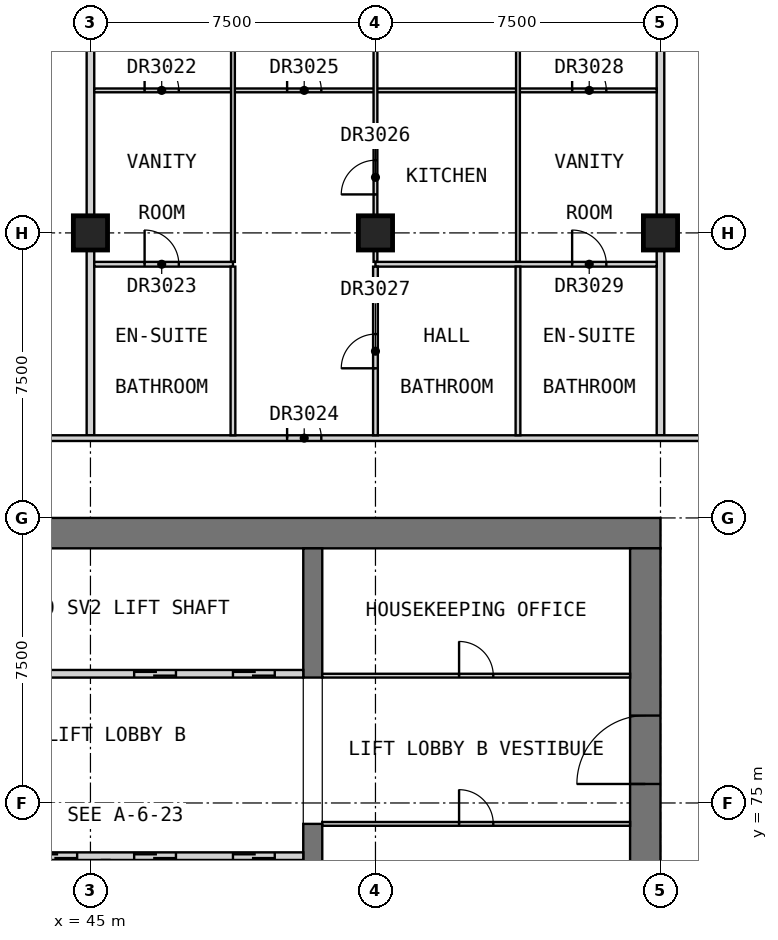
"""IFC4 building model, lengths in metres.
Left out: names, types, materials, properties, quantities, classifications, styles, units other than length and angle.
Written with IfcOpenShell. Run it as: python <this file> out.ifc"""

import sys

from ifc_helpers import new_model, si_unit, direction, frame, frame_2d, origin, origin_2d, place, context, subcontext, project, spatial, rectangle, extrude, element, fill, save


model = new_model("IFC4")
c1 = context("Model", 3, precision=1e-05, world=origin(), true_north=direction((0.0, 1.0)))
c2 = subcontext(c1, "Body", "Model", "MODEL_VIEW")
j1 = project(units=[si_unit("LENGTHUNIT", "METRE"), si_unit("PLANEANGLEUNIT", "RADIAN")], contexts=[c1])
p1 = place(None, origin())
s1 = spatial("IfcSite", under=j1, at=p1, CompositionType="ELEMENT")
p2 = place(p1, origin())
s2 = spatial("IfcBuilding", under=s1, at=p2, CompositionType="ELEMENT")
p3 = place(p2, frame((0.0, 0.0, 186.2)))
s3 = spatial("IfcBuildingStorey", under=s2, at=p3, CompositionType="ELEMENT", Elevation=186.2)
for number, where, z_axis, x_axis in (
    (1, (45.0, 90.0, 0.0), (0.0, 0.0, 1.0), (1.0, 0.0, 0.0)),
    (2, (52.5, 90.0, 0.0), (0.0, 0.0, 1.0), (1.0, 0.0, 0.0)),
    (3, (60.0, 90.0, 0.0), (0.0, 0.0, 1.0), (1.0, 0.0, 0.0)),
):
    element("IfcColumn", number, at=place(p3, frame(where, z_axis=z_axis, x_axis=x_axis)), inside=s3, PredefinedType="COLUMN", context=c2, shape_type="SweptSolid", body=[
        extrude(rectangle(XDim=0.9, YDim=0.9, at=origin_2d()), origin(), (0.0, 0.0, 1.0), 3.5),
    ])
p4 = place(p3, frame((30.0, 82.1, 0.0), z_axis=(0.0, 0.0, 1.0), x_axis=(1.0, 0.0, 0.0)))
e4 = element("IfcWall", 4, at=p4, inside=s3, PredefinedType="SHEAR", context=c2, shape_type="SweptSolid", body=[
    extrude(rectangle(XDim=30.0, YDim=0.8, at=frame_2d((15.0, 0.0))), origin(), (0.0, 0.0, 1.0), 3.5),
])
p5 = place(p3, frame((59.6, 60.8, 0.0), z_axis=(0.0, 0.0, 1.0), x_axis=(0.0, 1.0, 0.0)))
e5 = element("IfcWall", 5, at=p5, inside=s3, PredefinedType="SHEAR", context=c2, shape_type="SweptSolid", body=[
    extrude(rectangle(XDim=20.9, YDim=0.8, at=frame_2d((10.45, 0.0))), origin(), (0.0, 0.0, 1.0), 3.5),
])
p6 = place(p5, frame((14.7, 0.0, 0.0)))
e6 = element("IfcOpeningElement", 6, at=p6, cuts=e5, PredefinedType="OPENING", context=c2, shape_type="SweptSolid", body=[
    extrude(rectangle(XDim=1.8, YDim=2.1, at=frame_2d((0.9, 1.05))), frame((0.0, 0.41, 0.0), z_axis=(0.0, -1.0, 0.0), x_axis=(1.0, 0.0, 0.0)), (0.0, 0.0, 1.0), 0.82),
])
p7 = place(p3, frame((50.85, 68.05, 0.0), z_axis=(0.0, 0.0, 1.0), x_axis=(0.0, 1.0, 0.0)))
e7 = element("IfcWall", 7, at=p7, inside=s3, PredefinedType="SHEAR", context=c2, shape_type="SweptSolid", body=[
    extrude(rectangle(XDim=6.4, YDim=0.5, at=frame_2d((3.2, 0.0))), origin(), (0.0, 0.0, 1.0), 3.5),
])
p8 = place(p3, frame((50.85, 78.3, 0.0), z_axis=(0.0, 0.0, 1.0), x_axis=(0.0, 1.0, 0.0)))
e8 = element("IfcWall", 8, at=p8, inside=s3, PredefinedType="SHEAR", context=c2, shape_type="SweptSolid", body=[
    extrude(rectangle(XDim=3.4, YDim=0.5, at=frame_2d((1.7, 0.0))), origin(), (0.0, 0.0, 1.0), 3.5),
])
p9 = place(p3, frame((35.0, 73.6, 0.0), z_axis=(0.0, 0.0, 1.0), x_axis=(1.0, 0.0, 0.0)))
e9 = element("IfcWall", 9, at=p9, inside=s3, PredefinedType="SOLIDWALL", context=c2, shape_type="SweptSolid", body=[
    extrude(rectangle(XDim=15.6, YDim=0.2, at=frame_2d((7.8, 0.0))), origin(), (0.0, 0.0, 1.0), 3.5),
])
p10 = place(p9, frame((0.75, 0.0, 0.0)))
e10 = element("IfcOpeningElement", 10, at=p10, cuts=e9, PredefinedType="OPENING", context=c2, shape_type="SweptSolid", body=[
    extrude(rectangle(XDim=1.1, YDim=2.1, at=frame_2d((0.55, 1.05))), frame((0.0, 0.11, 0.0), z_axis=(0.0, -1.0, 0.0), x_axis=(1.0, 0.0, 0.0)), (0.0, 0.0, 1.0), 0.22),
])
p11 = place(p9, frame((3.35, 0.0, 0.0)))
e11 = element("IfcOpeningElement", 11, at=p11, cuts=e9, PredefinedType="OPENING", context=c2, shape_type="SweptSolid", body=[
    extrude(rectangle(XDim=1.1, YDim=2.1, at=frame_2d((0.55, 1.05))), frame((0.0, 0.11, 0.0), z_axis=(0.0, -1.0, 0.0), x_axis=(1.0, 0.0, 0.0)), (0.0, 0.0, 1.0), 0.22),
])
p12 = place(p9, frame((5.95, 0.0, 0.0)))
e12 = element("IfcOpeningElement", 12, at=p12, cuts=e9, PredefinedType="OPENING", context=c2, shape_type="SweptSolid", body=[
    extrude(rectangle(XDim=1.1, YDim=2.1, at=frame_2d((0.55, 1.05))), frame((0.0, 0.11, 0.0), z_axis=(0.0, -1.0, 0.0), x_axis=(1.0, 0.0, 0.0)), (0.0, 0.0, 1.0), 0.22),
])
p13 = place(p9, frame((8.55, 0.0, 0.0)))
e13 = element("IfcOpeningElement", 13, at=p13, cuts=e9, PredefinedType="OPENING", context=c2, shape_type="SweptSolid", body=[
    extrude(rectangle(XDim=1.1, YDim=2.1, at=frame_2d((0.55, 1.05))), frame((0.0, 0.11, 0.0), z_axis=(0.0, -1.0, 0.0), x_axis=(1.0, 0.0, 0.0)), (0.0, 0.0, 1.0), 0.22),
])
p14 = place(p9, frame((11.15, 0.0, 0.0)))
e14 = element("IfcOpeningElement", 14, at=p14, cuts=e9, PredefinedType="OPENING", context=c2, shape_type="SweptSolid", body=[
    extrude(rectangle(XDim=1.1, YDim=2.1, at=frame_2d((0.55, 1.05))), frame((0.0, 0.11, 0.0), z_axis=(0.0, -1.0, 0.0), x_axis=(1.0, 0.0, 0.0)), (0.0, 0.0, 1.0), 0.22),
])
p15 = place(p9, frame((13.75, 0.0, 0.0)))
e15 = element("IfcOpeningElement", 15, at=p15, cuts=e9, PredefinedType="OPENING", context=c2, shape_type="SweptSolid", body=[
    extrude(rectangle(XDim=1.1, YDim=2.1, at=frame_2d((0.55, 1.05))), frame((0.0, 0.11, 0.0), z_axis=(0.0, -1.0, 0.0), x_axis=(1.0, 0.0, 0.0)), (0.0, 0.0, 1.0), 0.22),
])
p16 = place(p3, frame((35.0, 78.4, 0.0), z_axis=(0.0, 0.0, 1.0), x_axis=(1.0, 0.0, 0.0)))
e16 = element("IfcWall", 16, at=p16, inside=s3, PredefinedType="SOLIDWALL", context=c2, shape_type="SweptSolid", body=[
    extrude(rectangle(XDim=15.6, YDim=0.2, at=frame_2d((7.8, 0.0))), origin(), (0.0, 0.0, 1.0), 3.5),
])
p17 = place(p16, frame((0.75, 0.0, 0.0)))
e17 = element("IfcOpeningElement", 17, at=p17, cuts=e16, PredefinedType="OPENING", context=c2, shape_type="SweptSolid", body=[
    extrude(rectangle(XDim=1.1, YDim=2.1, at=frame_2d((0.55, 1.05))), frame((0.0, 0.11, 0.0), z_axis=(0.0, -1.0, 0.0), x_axis=(1.0, 0.0, 0.0)), (0.0, 0.0, 1.0), 0.22),
])
p18 = place(p16, frame((3.35, 0.0, 0.0)))
e18 = element("IfcOpeningElement", 18, at=p18, cuts=e16, PredefinedType="OPENING", context=c2, shape_type="SweptSolid", body=[
    extrude(rectangle(XDim=1.1, YDim=2.1, at=frame_2d((0.55, 1.05))), frame((0.0, 0.11, 0.0), z_axis=(0.0, -1.0, 0.0), x_axis=(1.0, 0.0, 0.0)), (0.0, 0.0, 1.0), 0.22),
])
p19 = place(p16, frame((11.15, 0.0, 0.0)))
e19 = element("IfcOpeningElement", 19, at=p19, cuts=e16, PredefinedType="OPENING", context=c2, shape_type="SweptSolid", body=[
    extrude(rectangle(XDim=1.1, YDim=2.1, at=frame_2d((0.55, 1.05))), frame((0.0, 0.11, 0.0), z_axis=(0.0, -1.0, 0.0), x_axis=(1.0, 0.0, 0.0)), (0.0, 0.0, 1.0), 0.22),
])
p20 = place(p16, frame((13.75, 0.0, 0.0)))
e20 = element("IfcOpeningElement", 20, at=p20, cuts=e16, PredefinedType="OPENING", context=c2, shape_type="SweptSolid", body=[
    extrude(rectangle(XDim=1.1, YDim=2.1, at=frame_2d((0.55, 1.05))), frame((0.0, 0.11, 0.0), z_axis=(0.0, -1.0, 0.0), x_axis=(1.0, 0.0, 0.0)), (0.0, 0.0, 1.0), 0.22),
])
p21 = place(p3, frame((51.1, 74.45, 0.0), z_axis=(0.0, 0.0, 1.0), x_axis=(1.0, 0.0, 0.0)))
e21 = element("IfcWall", 21, at=p21, inside=s3, PredefinedType="PARTITIONING", context=c2, shape_type="SweptSolid", body=[
    extrude(rectangle(XDim=8.1, YDim=0.1, at=frame_2d((4.05, 0.0))), origin(), (0.0, 0.0, 1.0), 3.25),
])
p22 = place(p21, frame((3.6, 0.0, 0.0)))
e22 = element("IfcOpeningElement", 22, at=p22, cuts=e21, PredefinedType="OPENING", context=c2, shape_type="SweptSolid", body=[
    extrude(rectangle(XDim=0.9, YDim=2.1, at=frame_2d((0.45, 1.05))), frame((0.0, 0.06, 0.0), z_axis=(0.0, -1.0, 0.0), x_axis=(1.0, 0.0, 0.0)), (0.0, 0.0, 1.0), 0.12),
])
p23 = place(p3, frame((51.1, 78.35, 0.0), z_axis=(0.0, 0.0, 1.0), x_axis=(1.0, 0.0, 0.0)))
e23 = element("IfcWall", 23, at=p23, inside=s3, PredefinedType="PARTITIONING", context=c2, shape_type="SweptSolid", body=[
    extrude(rectangle(XDim=8.1, YDim=0.1, at=frame_2d((4.05, 0.0))), origin(), (0.0, 0.0, 1.0), 3.25),
])
p24 = place(p23, frame((3.6, 0.0, 0.0)))
e24 = element("IfcOpeningElement", 24, at=p24, cuts=e23, PredefinedType="OPENING", context=c2, shape_type="SweptSolid", body=[
    extrude(rectangle(XDim=0.9, YDim=2.1, at=frame_2d((0.45, 1.05))), frame((0.0, 0.06, 0.0), z_axis=(0.0, -1.0, 0.0), x_axis=(1.0, 0.0, 0.0)), (0.0, 0.0, 1.0), 0.12),
])
for number, where, z_axis, x_axis in (
    (25, (45.0, 84.675, 0.0), (0.0, 0.0, 1.0), (0.0, 1.0, 0.0)),
    (26, (60.0, 84.675, 0.0), (0.0, 0.0, 1.0), (0.0, 1.0, 0.0)),
):
    element("IfcWall", number, at=place(p3, frame(where, z_axis=z_axis, x_axis=x_axis)), inside=s3, PredefinedType="PARTITIONING", context=c2, shape_type="SweptSolid", body=[
        extrude(rectangle(XDim=16.575, YDim=0.2, at=frame_2d((8.288, 0.0))), origin(), (0.0, 0.0, 1.0), 3.25),
    ])
p25 = place(p3, frame((33.75, 84.6, 0.0), z_axis=(0.0, 0.0, 1.0), x_axis=(1.0, 0.0, 0.0)))
e27 = element("IfcWall", 27, at=p25, inside=s3, PredefinedType="PARTITIONING", context=c2, shape_type="SweptSolid", body=[
    extrude(rectangle(XDim=28.35, YDim=0.15, at=frame_2d((14.175, 0.0))), origin(), (0.0, 0.0, 1.0), 3.25),
])
p26 = place(p25, frame((5.125, 0.0, 0.0)))
e28 = element("IfcOpeningElement", 28, at=p26, cuts=e27, PredefinedType="OPENING", context=c2, shape_type="SweptSolid", body=[
    extrude(rectangle(XDim=1.0, YDim=2.1, at=frame_2d((0.5, 1.05))), frame((0.0, 0.085, 0.0), z_axis=(0.0, -1.0, 0.0), x_axis=(1.0, 0.0, 0.0)), (0.0, 0.0, 1.0), 0.17),
])
p27 = place(p25, frame((16.425, 0.0, 0.0)))
e29 = element("IfcOpeningElement", 29, at=p27, cuts=e27, PredefinedType="OPENING", context=c2, shape_type="SweptSolid", body=[
    extrude(rectangle(XDim=0.9, YDim=2.1, at=frame_2d((0.45, 1.05))), frame((0.0, 0.085, 0.0), z_axis=(0.0, -1.0, 0.0), x_axis=(1.0, 0.0, 0.0)), (0.0, 0.0, 1.0), 0.17),
])
p28 = place(p3, frame((45.1, 93.75, 0.0), z_axis=(0.0, 0.0, 1.0), x_axis=(1.0, 0.0, 0.0)))
e30 = element("IfcWall", 30, at=p28, inside=s3, PredefinedType="PARTITIONING", context=c2, shape_type="SweptSolid", body=[
    extrude(rectangle(XDim=14.8, YDim=0.1, at=frame_2d((7.4, 0.0))), origin(), (0.0, 0.0, 1.0), 3.25),
])
p29 = place(p28, frame((1.325, 0.0, 0.0)))
e31 = element("IfcOpeningElement", 31, at=p29, cuts=e30, PredefinedType="OPENING", context=c2, shape_type="SweptSolid", body=[
    extrude(rectangle(XDim=0.9, YDim=2.1, at=frame_2d((0.45, 1.05))), frame((0.0, 0.06, 0.0), z_axis=(0.0, -1.0, 0.0), x_axis=(1.0, 0.0, 0.0)), (0.0, 0.0, 1.0), 0.12),
])
p30 = place(p28, frame((5.075, 0.0, 0.0)))
e32 = element("IfcOpeningElement", 32, at=p30, cuts=e30, PredefinedType="OPENING", context=c2, shape_type="SweptSolid", body=[
    extrude(rectangle(XDim=0.9, YDim=2.1, at=frame_2d((0.45, 1.05))), frame((0.0, 0.06, 0.0), z_axis=(0.0, -1.0, 0.0), x_axis=(1.0, 0.0, 0.0)), (0.0, 0.0, 1.0), 0.12),
])
p31 = place(p28, frame((12.575, 0.0, 0.0)))
e33 = element("IfcOpeningElement", 33, at=p31, cuts=e30, PredefinedType="OPENING", context=c2, shape_type="SweptSolid", body=[
    extrude(rectangle(XDim=0.9, YDim=2.1, at=frame_2d((0.45, 1.05))), frame((0.0, 0.06, 0.0), z_axis=(0.0, -1.0, 0.0), x_axis=(1.0, 0.0, 0.0)), (0.0, 0.0, 1.0), 0.12),
])
p32 = place(p3, frame((48.75, 89.238, 0.0), z_axis=(0.0, 0.0, 1.0), x_axis=(0.0, 1.0, 0.0)))
e34 = element("IfcWall", 34, at=p32, inside=s3, PredefinedType="PARTITIONING", context=c2, shape_type="SweptSolid", body=[
    extrude(rectangle(XDim=11.202, YDim=0.1, at=frame_2d((5.601, 0.0))), origin(), (0.0, 0.0, 1.0), 3.25),
])
p33 = place(p32, frame((7.812, 0.0, 0.0)))
e35 = element("IfcOpeningElement", 35, at=p33, cuts=e34, PredefinedType="OPENING", context=c2, shape_type="SweptSolid", body=[
    extrude(rectangle(XDim=0.9, YDim=2.1, at=frame_2d((0.45, 1.05))), frame((0.0, 0.06, 0.0), z_axis=(0.0, -1.0, 0.0), x_axis=(1.0, 0.0, 0.0)), (0.0, 0.0, 1.0), 0.12),
])
p34 = place(p3, frame((52.5, 89.238, 0.0), z_axis=(0.0, 0.0, 1.0), x_axis=(0.0, 1.0, 0.0)))
e36 = element("IfcWall", 36, at=p34, inside=s3, PredefinedType="PARTITIONING", context=c2, shape_type="SweptSolid", body=[
    extrude(rectangle(XDim=12.012, YDim=0.1, at=frame_2d((6.006, 0.0))), origin(), (0.0, 0.0, 1.0), 3.25),
])
p35 = place(p34, frame((1.775, 0.0, 0.0)))
e37 = element("IfcOpeningElement", 37, at=p35, cuts=e36, PredefinedType="OPENING", context=c2, shape_type="SweptSolid", body=[
    extrude(rectangle(XDim=0.9, YDim=2.1, at=frame_2d((0.45, 1.05))), frame((0.0, 0.06, 0.0), z_axis=(0.0, -1.0, 0.0), x_axis=(1.0, 0.0, 0.0)), (0.0, 0.0, 1.0), 0.12),
])
p36 = place(p34, frame((8.262, 0.0, 0.0)))
e38 = element("IfcOpeningElement", 38, at=p36, cuts=e36, PredefinedType="OPENING", context=c2, shape_type="SweptSolid", body=[
    extrude(rectangle(XDim=0.9, YDim=2.1, at=frame_2d((0.45, 1.05))), frame((0.0, 0.06, 0.0), z_axis=(0.0, -1.0, 0.0), x_axis=(1.0, 0.0, 0.0)), (0.0, 0.0, 1.0), 0.12),
])
p37 = place(p3, frame((56.25, 89.238, 0.0), z_axis=(0.0, 0.0, 1.0), x_axis=(0.0, 1.0, 0.0)))
e39 = element("IfcWall", 39, at=p37, inside=s3, PredefinedType="PARTITIONING", context=c2, shape_type="SweptSolid", body=[
    extrude(rectangle(XDim=11.202, YDim=0.1, at=frame_2d((5.601, 0.0))), origin(), (0.0, 0.0, 1.0), 3.25),
])
p38 = place(p37, frame((7.812, 0.0, 0.0)))
e40 = element("IfcOpeningElement", 40, at=p38, cuts=e39, PredefinedType="OPENING", context=c2, shape_type="SweptSolid", body=[
    extrude(rectangle(XDim=0.9, YDim=2.1, at=frame_2d((0.45, 1.05))), frame((0.0, 0.06, 0.0), z_axis=(0.0, -1.0, 0.0), x_axis=(1.0, 0.0, 0.0)), (0.0, 0.0, 1.0), 0.12),
])
p39 = place(p3, frame((45.1, 89.175, 0.0), z_axis=(0.0, 0.0, 1.0), x_axis=(1.0, 0.0, 0.0)))
e41 = element("IfcWall", 41, at=p39, inside=s3, PredefinedType="PARTITIONING", context=c2, shape_type="SweptSolid", body=[
    extrude(rectangle(XDim=3.65, YDim=0.125, at=frame_2d((1.825, 0.0))), origin(), (0.0, 0.0, 1.0), 3.25),
])
p40 = place(p39, frame((1.325, 0.0, 0.0)))
e42 = element("IfcOpeningElement", 42, at=p40, cuts=e41, PredefinedType="OPENING", context=c2, shape_type="SweptSolid", body=[
    extrude(rectangle(XDim=0.9, YDim=2.1, at=frame_2d((0.45, 1.05))), frame((0.0, 0.073, 0.0), z_axis=(0.0, -1.0, 0.0), x_axis=(1.0, 0.0, 0.0)), (0.0, 0.0, 1.0), 0.145),
])
p41 = place(p3, frame((52.5, 89.175, 0.0), z_axis=(0.0, 0.0, 1.0), x_axis=(1.0, 0.0, 0.0)))
e43 = element("IfcWall", 43, at=p41, inside=s3, PredefinedType="PARTITIONING", context=c2, shape_type="SweptSolid", body=[
    extrude(rectangle(XDim=7.4, YDim=0.125, at=frame_2d((3.7, 0.0))), origin(), (0.0, 0.0, 1.0), 3.25),
])
p42 = place(p41, frame((5.175, 0.0, 0.0)))
e44 = element("IfcOpeningElement", 44, at=p42, cuts=e43, PredefinedType="OPENING", context=c2, shape_type="SweptSolid", body=[
    extrude(rectangle(XDim=0.9, YDim=2.1, at=frame_2d((0.45, 1.05))), frame((0.0, 0.073, 0.0), z_axis=(0.0, -1.0, 0.0), x_axis=(1.0, 0.0, 0.0)), (0.0, 0.0, 1.0), 0.145),
])
p43 = place(p3, frame((48.75, 84.675, 0.0), z_axis=(0.0, 0.0, 1.0), x_axis=(0.0, 1.0, 0.0)))
e45 = element("IfcWall", 45, at=p43, inside=s3, PredefinedType="PARTITIONING", context=c2, shape_type="SweptSolid", body=[
    extrude(rectangle(XDim=4.438, YDim=0.125, at=frame_2d((2.219, 0.0))), origin(), (0.0, 0.0, 1.0), 3.25),
])
p44 = place(p3, frame((52.5, 84.675, 0.0), z_axis=(0.0, 0.0, 1.0), x_axis=(0.0, 1.0, 0.0)))
e46 = element("IfcWall", 46, at=p44, inside=s3, PredefinedType="PARTITIONING", context=c2, shape_type="SweptSolid", body=[
    extrude(rectangle(XDim=4.438, YDim=0.125, at=frame_2d((2.219, 0.0))), origin(), (0.0, 0.0, 1.0), 3.25),
])
p45 = place(p44, frame((1.762, 0.0, 0.0)))
e47 = element("IfcOpeningElement", 47, at=p45, cuts=e46, PredefinedType="OPENING", context=c2, shape_type="SweptSolid", body=[
    extrude(rectangle(XDim=0.9, YDim=2.1, at=frame_2d((0.45, 1.05))), frame((0.0, 0.073, 0.0), z_axis=(0.0, -1.0, 0.0), x_axis=(1.0, 0.0, 0.0)), (0.0, 0.0, 1.0), 0.145),
])
p46 = place(p3, frame((56.25, 84.675, 0.0), z_axis=(0.0, 0.0, 1.0), x_axis=(0.0, 1.0, 0.0)))
e48 = element("IfcWall", 48, at=p46, inside=s3, PredefinedType="PARTITIONING", context=c2, shape_type="SweptSolid", body=[
    extrude(rectangle(XDim=4.438, YDim=0.125, at=frame_2d((2.219, 0.0))), origin(), (0.0, 0.0, 1.0), 3.25),
])
p47 = place(p13, origin())
e49 = element("IfcDoor", 49, at=p47, inside=s3, OperationType="DOUBLE_DOOR_SLIDING", PredefinedType="DOOR", context=c2, shape_type="SweptSolid", body=[
    extrude(rectangle(XDim=1.1, YDim=2.1, at=frame_2d((0.55, 1.05))), frame((0.0, 0.025, 0.0), z_axis=(0.0, -1.0, 0.0), x_axis=(1.0, 0.0, 0.0)), (0.0, 0.0, 1.0), 0.05),
])
fill(e13, e49)
p48 = place(p14, origin())
e50 = element("IfcDoor", 50, at=p48, inside=s3, OperationType="DOUBLE_DOOR_SLIDING", PredefinedType="DOOR", context=c2, shape_type="SweptSolid", body=[
    extrude(rectangle(XDim=1.1, YDim=2.1, at=frame_2d((0.55, 1.05))), frame((0.0, 0.025, 0.0), z_axis=(0.0, -1.0, 0.0), x_axis=(1.0, 0.0, 0.0)), (0.0, 0.0, 1.0), 0.05),
])
fill(e14, e50)
p49 = place(p15, origin())
e51 = element("IfcDoor", 51, at=p49, inside=s3, OperationType="DOUBLE_DOOR_SLIDING", PredefinedType="DOOR", context=c2, shape_type="SweptSolid", body=[
    extrude(rectangle(XDim=1.1, YDim=2.1, at=frame_2d((0.55, 1.05))), frame((0.0, 0.025, 0.0), z_axis=(0.0, -1.0, 0.0), x_axis=(1.0, 0.0, 0.0)), (0.0, 0.0, 1.0), 0.05),
])
fill(e15, e51)
p50 = place(p19, origin())
e52 = element("IfcDoor", 52, at=p50, inside=s3, OperationType="DOUBLE_DOOR_SLIDING", PredefinedType="DOOR", context=c2, shape_type="SweptSolid", body=[
    extrude(rectangle(XDim=1.1, YDim=2.1, at=frame_2d((0.55, 1.05))), frame((0.0, 0.025, 0.0), z_axis=(0.0, -1.0, 0.0), x_axis=(1.0, 0.0, 0.0)), (0.0, 0.0, 1.0), 0.05),
])
fill(e19, e52)
p51 = place(p20, origin())
e53 = element("IfcDoor", 53, at=p51, inside=s3, OperationType="DOUBLE_DOOR_SLIDING", PredefinedType="DOOR", context=c2, shape_type="SweptSolid", body=[
    extrude(rectangle(XDim=1.1, YDim=2.1, at=frame_2d((0.55, 1.05))), frame((0.0, 0.025, 0.0), z_axis=(0.0, -1.0, 0.0), x_axis=(1.0, 0.0, 0.0)), (0.0, 0.0, 1.0), 0.05),
])
fill(e20, e53)
p52 = place(p6, origin())
e54 = element("IfcDoor", 54, at=p52, inside=s3, OperationType="DOUBLE_DOOR_SINGLE_SWING", PredefinedType="DOOR", context=c2, shape_type="SweptSolid", body=[
    extrude(rectangle(XDim=1.8, YDim=2.1, at=frame_2d((0.9, 1.05))), frame((0.0, 0.025, 0.0), z_axis=(0.0, -1.0, 0.0), x_axis=(1.0, 0.0, 0.0)), (0.0, 0.0, 1.0), 0.05),
])
fill(e6, e54)
p53 = place(p22, origin())
e55 = element("IfcDoor", 55, at=p53, inside=s3, OperationType="SINGLE_SWING_LEFT", PredefinedType="DOOR", context=c2, shape_type="SweptSolid", body=[
    extrude(rectangle(XDim=0.9, YDim=2.1, at=frame_2d((0.45, 1.05))), frame((0.0, 0.025, 0.0), z_axis=(0.0, -1.0, 0.0), x_axis=(1.0, 0.0, 0.0)), (0.0, 0.0, 1.0), 0.05),
])
fill(e22, e55)
p54 = place(p24, origin())
e56 = element("IfcDoor", 56, at=p54, inside=s3, OperationType="SINGLE_SWING_LEFT", PredefinedType="DOOR", context=c2, shape_type="SweptSolid", body=[
    extrude(rectangle(XDim=0.9, YDim=2.1, at=frame_2d((0.45, 1.05))), frame((0.0, 0.025, 0.0), z_axis=(0.0, -1.0, 0.0), x_axis=(1.0, 0.0, 0.0)), (0.0, 0.0, 1.0), 0.05),
])
fill(e24, e56)
p55 = place(p29, origin())
e57 = element("IfcDoor", 57, at=p55, inside=s3, OperationType="SINGLE_SWING_RIGHT", PredefinedType="DOOR", context=c2, shape_type="SweptSolid", body=[
    extrude(rectangle(XDim=0.9, YDim=2.1, at=frame_2d((0.45, 1.05))), frame((0.0, 0.025, 0.0), z_axis=(0.0, -1.0, 0.0), x_axis=(1.0, 0.0, 0.0)), (0.0, 0.0, 1.0), 0.05),
])
fill(e31, e57)
p56 = place(p40, origin())
e58 = element("IfcDoor", 58, at=p56, inside=s3, OperationType="SINGLE_SWING_RIGHT", PredefinedType="DOOR", context=c2, shape_type="SweptSolid", body=[
    extrude(rectangle(XDim=0.9, YDim=2.1, at=frame_2d((0.45, 1.05))), frame((0.0, 0.025, 0.0), z_axis=(0.0, -1.0, 0.0), x_axis=(1.0, 0.0, 0.0)), (0.0, 0.0, 1.0), 0.05),
])
fill(e42, e58)
p57 = place(p27, origin())
e59 = element("IfcDoor", 59, at=p57, inside=s3, OperationType="SINGLE_SWING_LEFT", PredefinedType="DOOR", context=c2, shape_type="SweptSolid", body=[
    extrude(rectangle(XDim=0.9, YDim=2.1, at=frame_2d((0.45, 1.05))), frame((0.0, 0.025, 0.0), z_axis=(0.0, -1.0, 0.0), x_axis=(1.0, 0.0, 0.0)), (0.0, 0.0, 1.0), 0.05),
])
fill(e29, e59)
p58 = place(p30, origin())
e60 = element("IfcDoor", 60, at=p58, inside=s3, OperationType="SINGLE_SWING_RIGHT", PredefinedType="DOOR", context=c2, shape_type="SweptSolid", body=[
    extrude(rectangle(XDim=0.9, YDim=2.1, at=frame_2d((0.45, 1.05))), frame((0.0, 0.025, 0.0), z_axis=(0.0, -1.0, 0.0), x_axis=(1.0, 0.0, 0.0)), (0.0, 0.0, 1.0), 0.05),
])
fill(e32, e60)
p59 = place(p35, origin())
e61 = element("IfcDoor", 61, at=p59, inside=s3, OperationType="SINGLE_SWING_RIGHT", PredefinedType="DOOR", context=c2, shape_type="SweptSolid", body=[
    extrude(rectangle(XDim=0.9, YDim=2.1, at=frame_2d((0.45, 1.05))), frame((0.0, 0.025, 0.0), z_axis=(0.0, -1.0, 0.0), x_axis=(1.0, 0.0, 0.0)), (0.0, 0.0, 1.0), 0.05),
])
fill(e37, e61)
p60 = place(p45, origin())
e62 = element("IfcDoor", 62, at=p60, inside=s3, OperationType="SINGLE_SWING_LEFT", PredefinedType="DOOR", context=c2, shape_type="SweptSolid", body=[
    extrude(rectangle(XDim=0.9, YDim=2.1, at=frame_2d((0.45, 1.05))), frame((0.0, 0.025, 0.0), z_axis=(0.0, -1.0, 0.0), x_axis=(1.0, 0.0, 0.0)), (0.0, 0.0, 1.0), 0.05),
])
fill(e47, e62)
p61 = place(p31, origin())
e63 = element("IfcDoor", 63, at=p61, inside=s3, OperationType="SINGLE_SWING_RIGHT", PredefinedType="DOOR", context=c2, shape_type="SweptSolid", body=[
    extrude(rectangle(XDim=0.9, YDim=2.1, at=frame_2d((0.45, 1.05))), frame((0.0, 0.025, 0.0), z_axis=(0.0, -1.0, 0.0), x_axis=(1.0, 0.0, 0.0)), (0.0, 0.0, 1.0), 0.05),
])
fill(e33, e63)
p62 = place(p42, origin())
e64 = element("IfcDoor", 64, at=p62, inside=s3, OperationType="SINGLE_SWING_RIGHT", PredefinedType="DOOR", context=c2, shape_type="SweptSolid", body=[
    extrude(rectangle(XDim=0.9, YDim=2.1, at=frame_2d((0.45, 1.05))), frame((0.0, 0.025, 0.0), z_axis=(0.0, -1.0, 0.0), x_axis=(1.0, 0.0, 0.0)), (0.0, 0.0, 1.0), 0.05),
])
fill(e44, e64)
save(model, sys.argv[1])
